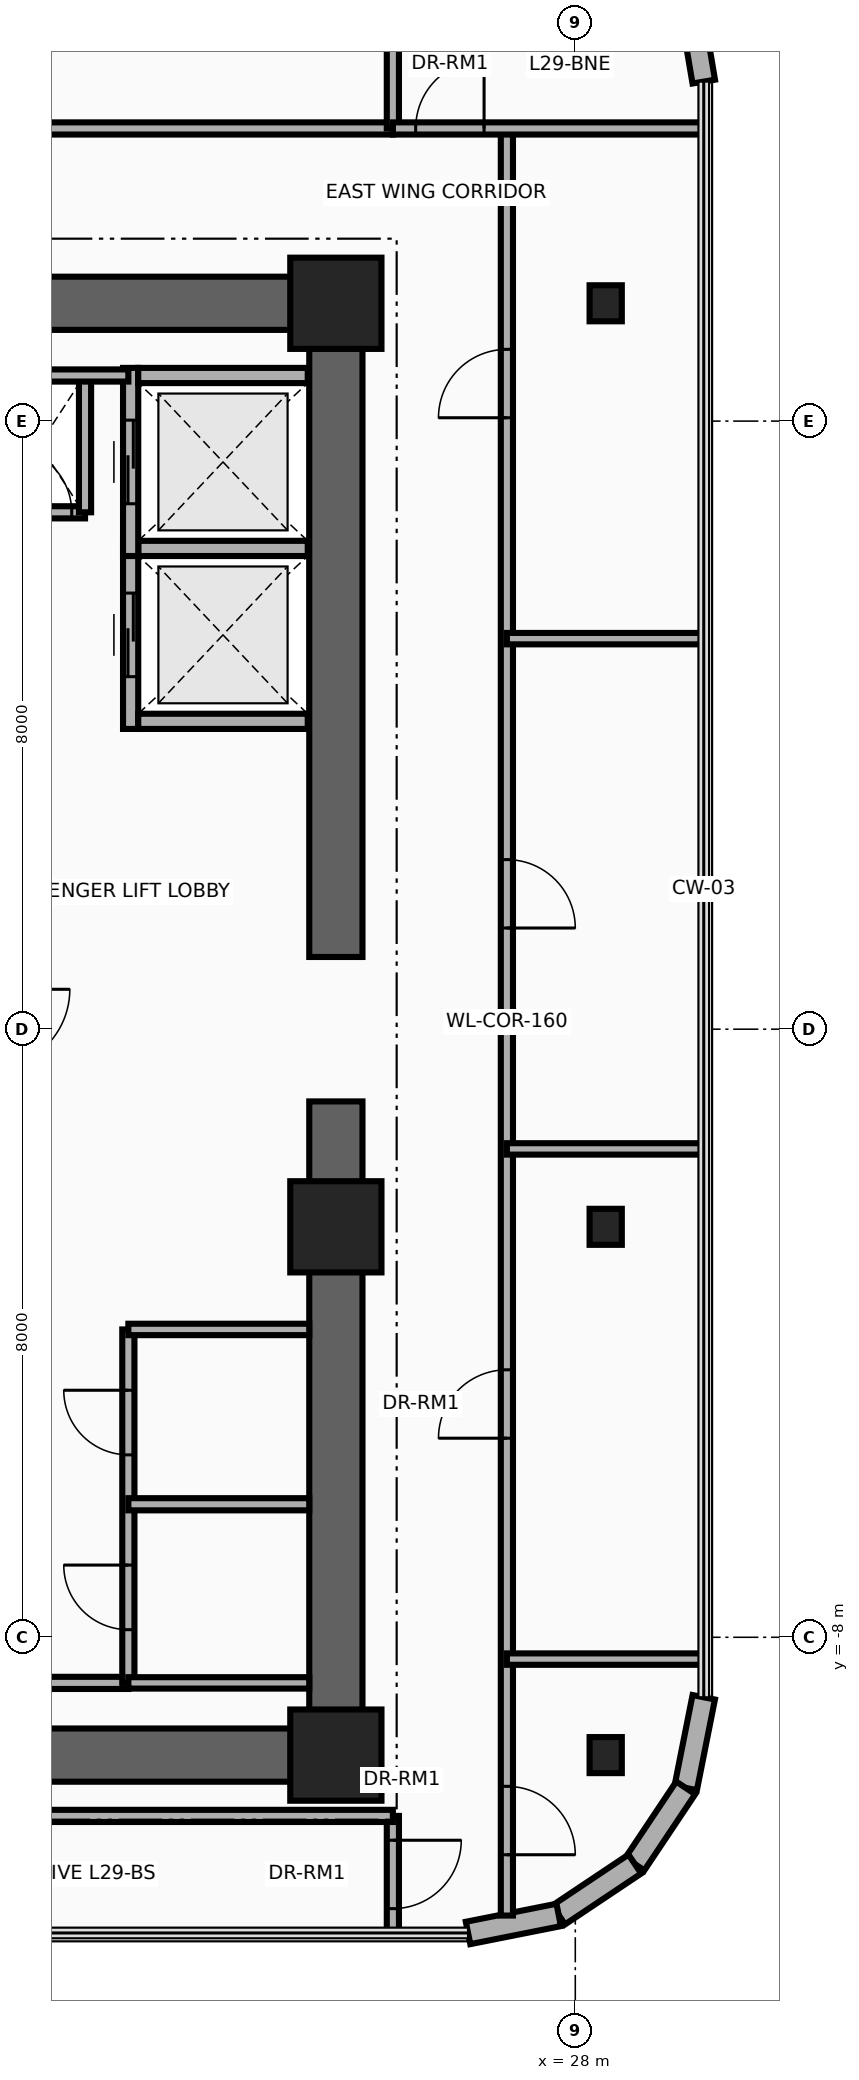
"""IFC4 building model, lengths in metres.
Left out: names, types, materials, properties, quantities, classifications, styles, units other than length and angle.
Written with IfcOpenShell. Run it as: python <this file> out.ifc"""

import sys

from ifc_helpers import new_model, si_unit, direction, frame, frame_2d, origin, origin_2d, place, context, subcontext, project, spatial, rectangle, i_section, extrude, source, transform, mapped, element, fill, save


model = new_model("IFC4")
c1 = context("Model", 3, precision=1e-05, world=origin(), true_north=direction((0.0, 1.0)))
c2 = subcontext(c1, "Body", "Model", "MODEL_VIEW")
j1 = project(units=[si_unit("LENGTHUNIT", "METRE"), si_unit("PLANEANGLEUNIT", "RADIAN")], contexts=[c1])
p1 = place(None, origin())
s1 = spatial("IfcSite", under=j1, at=p1, CompositionType="ELEMENT")
p2 = place(p1, origin())
s2 = spatial("IfcBuilding", under=s1, at=p2, CompositionType="ELEMENT")
p3 = place(p2, frame((0.0, 0.0, 116.8)))
s3 = spatial("IfcBuildingStorey", under=s2, at=p3, CompositionType="ELEMENT", Elevation=116.8)
for number, where, z_axis, x_axis in (
    (1, (24.85, -9.9, 0.0), (0.0, 0.0, 1.0), (0.0, 1.0, 0.0)),
    (2, (24.85, 0.95, 0.0), (0.0, 0.0, 1.0), (0.0, 1.0, 0.0)),
):
    element("IfcWall", number, at=place(p3, frame(where, z_axis=z_axis, x_axis=x_axis)), inside=s3, PredefinedType="SHEAR", context=c2, shape_type="SweptSolid", body=[
        extrude(rectangle(XDim=8.95, YDim=0.7, at=frame_2d((4.475, 0.0))), origin(), (0.0, 0.0, 1.0), 3.46),
    ])
for number, where, z_axis, x_axis in (
    (3, (15.85, 9.55, 0.0), (0.0, 0.0, 1.0), (1.0, 0.0, 0.0)),
    (4, (15.85, -9.55, 0.0), (0.0, 0.0, 1.0), (1.0, 0.0, 0.0)),
):
    element("IfcWall", number, at=place(p3, frame(where, z_axis=z_axis, x_axis=x_axis)), inside=s3, PredefinedType="SHEAR", context=c2, shape_type="SweptSolid", body=[
        extrude(rectangle(XDim=9.0, YDim=0.7, at=frame_2d((4.5, 0.0))), origin(), (0.0, 0.0, 1.0), 3.46),
    ])
m1 = source(origin(), c2, "Body", "SweptSolid", [
    extrude(rectangle(XDim=1.2, YDim=1.2, at=origin_2d()), origin(), (0.0, 0.0, 1.0), 3.7),
])
p4 = place(p3, frame((24.85, -9.55, 0.0), z_axis=(0.0, 0.0, 1.0), x_axis=(1.0, 0.0, 0.0)))
e5 = element("IfcColumn", 5, at=p4, inside=s3, PredefinedType="COLUMN", context=c2, shape_type="MappedRepresentation", body=[
    mapped(m1, transform((0.0, 0.0, 0.0), x_axis=(1.0, 0.0, 0.0), y_axis=(0.0, 1.0, 0.0), z_axis=(0.0, 0.0, 1.0), scale=1.0)),
])
m2 = source(origin(), c2, "Body", "SweptSolid", [
    extrude(i_section(OverallWidth=0.424, OverallDepth=0.474, WebThickness=0.048, FlangeThickness=0.077, at=origin_2d()), origin(), (0.0, 0.0, 1.0), 3.7),
])
p5 = place(p3, frame((28.4, -9.55, 0.0), z_axis=(0.0, 0.0, 1.0), x_axis=(1.0, 0.0, 0.0)))
e6 = element("IfcColumn", 6, at=p5, inside=s3, PredefinedType="COLUMN", context=c2, shape_type="MappedRepresentation", body=[
    mapped(m2, transform((0.0, 0.0, 0.0), x_axis=(1.0, 0.0, 0.0), y_axis=(0.0, 1.0, 0.0), z_axis=(0.0, 0.0, 1.0), scale=1.0)),
])
p6 = place(p3, frame((24.85, -2.6, 0.0), z_axis=(0.0, 0.0, 1.0), x_axis=(1.0, 0.0, 0.0)))
e7 = element("IfcColumn", 7, at=p6, inside=s3, PredefinedType="COLUMN", context=c2, shape_type="MappedRepresentation", body=[
    mapped(m1, transform((0.0, 0.0, 0.0), x_axis=(1.0, 0.0, 0.0), y_axis=(0.0, 1.0, 0.0), z_axis=(0.0, 0.0, 1.0), scale=1.0)),
])
p7 = place(p3, frame((28.4, -2.6, 0.0), z_axis=(0.0, 0.0, 1.0), x_axis=(1.0, 0.0, 0.0)))
e8 = element("IfcColumn", 8, at=p7, inside=s3, PredefinedType="COLUMN", context=c2, shape_type="MappedRepresentation", body=[
    mapped(m2, transform((0.0, 0.0, 0.0), x_axis=(1.0, 0.0, 0.0), y_axis=(0.0, 1.0, 0.0), z_axis=(0.0, 0.0, 1.0), scale=1.0)),
])
p8 = place(p3, frame((24.85, 9.55, 0.0), z_axis=(0.0, 0.0, 1.0), x_axis=(1.0, 0.0, 0.0)))
e9 = element("IfcColumn", 9, at=p8, inside=s3, PredefinedType="COLUMN", context=c2, shape_type="MappedRepresentation", body=[
    mapped(m1, transform((0.0, 0.0, 0.0), x_axis=(1.0, 0.0, 0.0), y_axis=(0.0, 1.0, 0.0), z_axis=(0.0, 0.0, 1.0), scale=1.0)),
])
p9 = place(p3, frame((28.4, 9.55, 0.0), z_axis=(0.0, 0.0, 1.0), x_axis=(1.0, 0.0, 0.0)))
e10 = element("IfcColumn", 10, at=p9, inside=s3, PredefinedType="COLUMN", context=c2, shape_type="MappedRepresentation", body=[
    mapped(m2, transform((0.0, 0.0, 0.0), x_axis=(1.0, 0.0, 0.0), y_axis=(0.0, 1.0, 0.0), z_axis=(0.0, 0.0, 1.0), scale=1.0)),
])
p10 = place(p3, frame((29.518, 13.488, 0.0), z_axis=(0.0, 0.0, 1.0), x_axis=(0.166156796952, -0.986099345313, 0.0)))
e11 = element("IfcWall", 11, at=p10, inside=s3, PredefinedType="SOLIDWALL", context=c2, shape_type="SweptSolid", body=[
    extrude(rectangle(XDim=1.036, YDim=0.3, at=frame_2d((0.518, 0.0))), origin(), (0.0, 0.0, 1.0), 3.46),
])
p11 = place(p3, frame((29.69, -8.789, 0.0), z_axis=(0.0, 0.0, 1.0), x_axis=(-0.194996050505, -0.980804027463, 0.0)))
e12 = element("IfcWall", 12, at=p11, inside=s3, PredefinedType="SOLIDWALL", context=c2, shape_type="SweptSolid", body=[
    extrude(rectangle(XDim=1.216, YDim=0.3, at=frame_2d((0.608, 0.0))), origin(), (0.0, 0.0, 1.0), 3.46),
])
for number, where, z_axis, x_axis in (
    (13, (29.453, -9.982, 0.0), (0.0, 0.0, 1.0), (-0.556, -0.831, 0.0)),
    (14, (28.783, -10.983, 0.0), (0.0, 0.0, 1.0), (-0.831, -0.556, 0.0)),
):
    element("IfcWall", number, at=place(p3, frame(where, z_axis=z_axis, x_axis=x_axis)), inside=s3, PredefinedType="SOLIDWALL", context=c2, shape_type="SweptSolid", body=[
        extrude(rectangle(XDim=1.205, YDim=0.3, at=frame_2d((0.603, 0.0))), origin(), (0.0, 0.0, 1.0), 3.46),
    ])
p12 = place(p3, frame((27.782, -11.653, 0.0), z_axis=(0.0, 0.0, 1.0), x_axis=(-0.980811661072, -0.194957650543, 0.0)))
e15 = element("IfcWall", 15, at=p12, inside=s3, PredefinedType="SOLIDWALL", context=c2, shape_type="SweptSolid", body=[
    extrude(rectangle(XDim=1.216, YDim=0.3, at=frame_2d((0.608, 0.0))), origin(), (0.0, 0.0, 1.0), 3.46),
])
p13 = place(p3, frame((22.15, 3.95, 0.0), z_axis=(0.0, 0.0, 1.0), x_axis=(0.0, 1.0, 0.0)))
e16 = element("IfcWall", 16, at=p13, inside=s3, PredefinedType="MOVABLE", context=c2, shape_type="SweptSolid", body=[
    extrude(rectangle(XDim=2.475, YDim=0.2, at=frame_2d((1.238, 0.0))), origin(), (0.0, 0.0, 1.0), 3.46),
])
p14 = place(p13, frame((0.688, 0.0, 0.0)))
e17 = element("IfcOpeningElement", 17, at=p14, cuts=e16, PredefinedType="OPENING", context=c2, shape_type="SweptSolid", body=[
    extrude(rectangle(XDim=1.1, YDim=2.1, at=frame_2d((0.55, 1.05))), frame((0.0, 0.115, 0.0), z_axis=(0.0, -1.0, 0.0), x_axis=(1.0, 0.0, 0.0)), (0.0, 0.0, 1.0), 0.23),
])
for number, where, z_axis, x_axis in (
    (18, (22.25, 4.05, 0.0), (0.0, 0.0, 1.0), (1.0, 0.0, 0.0)),
    (19, (22.25, 6.325, 0.0), (0.0, 0.0, 1.0), (1.0, 0.0, 0.0)),
):
    element("IfcWall", number, at=place(p3, frame(where, z_axis=z_axis, x_axis=x_axis)), inside=s3, PredefinedType="MOVABLE", context=c2, shape_type="SweptSolid", body=[
        extrude(rectangle(XDim=2.23, YDim=0.2, at=frame_2d((1.115, 0.0))), origin(), (0.0, 0.0, 1.0), 2.245),
    ])
p15 = place(p3, frame((22.15, 6.225, 0.0), z_axis=(0.0, 0.0, 1.0), x_axis=(0.0, 1.0, 0.0)))
e20 = element("IfcWall", 20, at=p15, inside=s3, PredefinedType="MOVABLE", context=c2, shape_type="SweptSolid", body=[
    extrude(rectangle(XDim=2.475, YDim=0.2, at=frame_2d((1.237, 0.0))), origin(), (0.0, 0.0, 1.0), 3.46),
])
p16 = place(p15, frame((0.688, 0.0, 0.0)))
e21 = element("IfcOpeningElement", 21, at=p16, cuts=e20, PredefinedType="OPENING", context=c2, shape_type="SweptSolid", body=[
    extrude(rectangle(XDim=1.1, YDim=2.1, at=frame_2d((0.55, 1.05))), frame((0.0, 0.115, 0.0), z_axis=(0.0, -1.0, 0.0), x_axis=(1.0, 0.0, 0.0)), (0.0, 0.0, 1.0), 0.23),
])
p17 = place(p3, frame((22.25, 8.6, 0.0), z_axis=(0.0, 0.0, 1.0), x_axis=(1.0, 0.0, 0.0)))
e22 = element("IfcWall", 22, at=p17, inside=s3, PredefinedType="MOVABLE", context=c2, shape_type="SweptSolid", body=[
    extrude(rectangle(XDim=2.23, YDim=0.2, at=frame_2d((1.115, 0.0))), origin(), (0.0, 0.0, 1.0), 2.245),
])
p18 = place(p3, frame((20.35, 6.8, 0.0), z_axis=(0.0, 0.0, 1.0), x_axis=(1.0, 0.0, 0.0)))
e23 = element("IfcWall", 23, at=p18, inside=s3, PredefinedType="PARTITIONING", context=c2, shape_type="SweptSolid", body=[
    extrude(rectangle(XDim=1.2, YDim=0.16, at=frame_2d((0.6, 0.0))), origin(), (0.0, 0.0, 1.0), 3.46),
])
p19 = place(p18, frame((0.175, 0.0, 0.0)))
e24 = element("IfcOpeningElement", 24, at=p19, cuts=e23, PredefinedType="OPENING", context=c2, shape_type="SweptSolid", body=[
    extrude(rectangle(XDim=0.85, YDim=2.05, at=frame_2d((0.425, 1.025))), frame((0.0, 0.095, 0.0), z_axis=(0.0, -1.0, 0.0), x_axis=(1.0, 0.0, 0.0)), (0.0, 0.0, 1.0), 0.19),
])
p20 = place(p3, frame((21.55, 6.8, 0.0), z_axis=(0.0, 0.0, 1.0), x_axis=(0.0, 1.0, 0.0)))
e25 = element("IfcWall", 25, at=p20, inside=s3, PredefinedType="PARTITIONING", context=c2, shape_type="SweptSolid", body=[
    extrude(rectangle(XDim=1.8, YDim=0.16, at=frame_2d((0.9, 0.0))), origin(), (0.0, 0.0, 1.0), 3.46),
])
for number, where, z_axis, x_axis in (
    (26, (20.3, -8.6, 0.0), (0.0, 0.0, 1.0), (1.0, 0.0, 0.0)),
    (27, (20.3, 8.6, 0.0), (0.0, 0.0, 1.0), (1.0, 0.0, 0.0)),
):
    element("IfcWall", number, at=place(p3, frame(where, z_axis=z_axis, x_axis=x_axis)), inside=s3, PredefinedType="PARTITIONING", context=c2, shape_type="SweptSolid", body=[
        extrude(rectangle(XDim=1.82, YDim=0.16, at=frame_2d((0.91, 0.0))), origin(), (0.0, 0.0, 1.0), 3.46),
    ])
p21 = place(p3, frame((22.12, -8.6, 0.0), z_axis=(0.0, 0.0, 1.0), x_axis=(0.0, 1.0, 0.0)))
e28 = element("IfcWall", 28, at=p21, inside=s3, PredefinedType="PARTITIONING", context=c2, shape_type="SweptSolid", body=[
    extrude(rectangle(XDim=4.65, YDim=0.16, at=frame_2d((2.325, 0.0))), origin(), (0.0, 0.0, 1.0), 3.46),
])
p22 = place(p21, frame((0.7, 0.0, 0.0)))
e29 = element("IfcOpeningElement", 29, at=p22, cuts=e28, PredefinedType="OPENING", context=c2, shape_type="SweptSolid", body=[
    extrude(rectangle(XDim=0.85, YDim=2.05, at=frame_2d((0.425, 1.025))), frame((0.0, 0.095, 0.0), z_axis=(0.0, -1.0, 0.0), x_axis=(1.0, 0.0, 0.0)), (0.0, 0.0, 1.0), 0.19),
])
p23 = place(p21, frame((3.0, 0.0, 0.0)))
e30 = element("IfcOpeningElement", 30, at=p23, cuts=e28, PredefinedType="OPENING", context=c2, shape_type="SweptSolid", body=[
    extrude(rectangle(XDim=0.85, YDim=2.05, at=frame_2d((0.425, 1.025))), frame((0.0, 0.095, 0.0), z_axis=(0.0, -1.0, 0.0), x_axis=(1.0, 0.0, 0.0)), (0.0, 0.0, 1.0), 0.19),
])
for number, where, z_axis, x_axis in (
    (31, (22.12, -3.95, 0.0), (0.0, 0.0, 1.0), (1.0, 0.0, 0.0)),
    (32, (22.12, -8.6, 0.0), (0.0, 0.0, 1.0), (1.0, 0.0, 0.0)),
):
    element("IfcWall", number, at=place(p3, frame(where, z_axis=z_axis, x_axis=x_axis)), inside=s3, PredefinedType="PARTITIONING", context=c2, shape_type="SweptSolid", body=[
        extrude(rectangle(XDim=2.38, YDim=0.15, at=frame_2d((1.19, 0.0))), origin(), (0.0, 0.0, 1.0), 3.46),
    ])
p24 = place(p3, frame((22.12, -6.25, 0.0), z_axis=(0.0, 0.0, 1.0), x_axis=(1.0, 0.0, 0.0)))
e33 = element("IfcWall", 33, at=p24, inside=s3, PredefinedType="PARTITIONING", context=c2, shape_type="SweptSolid", body=[
    extrude(rectangle(XDim=2.38, YDim=0.16, at=frame_2d((1.19, 0.0))), origin(), (0.0, 0.0, 1.0), 3.46),
])
p25 = place(p3, frame((15.4, 11.85, 0.0), z_axis=(0.0, 0.0, 1.0), x_axis=(1.0, 0.0, 0.0)))
e34 = element("IfcWall", 34, at=p25, inside=s3, PredefinedType="PARTITIONING", context=c2, shape_type="SweptSolid", body=[
    extrude(rectangle(XDim=10.2, YDim=0.16, at=frame_2d((5.1, 0.0))), origin(), (0.0, 0.0, 1.0), 2.834),
])
p26 = place(p25, frame((4.625, 0.0, 0.0)))
e35 = element("IfcOpeningElement", 35, at=p26, cuts=e34, PredefinedType="OPENING", context=c2, shape_type="SweptSolid", body=[
    extrude(rectangle(XDim=0.95, YDim=2.15, at=frame_2d((0.475, 1.075))), frame((0.0, 0.095, 0.0), z_axis=(0.0, -1.0, 0.0), x_axis=(1.0, 0.0, 0.0)), (0.0, 0.0, 1.0), 0.19),
])
p27 = place(p3, frame((25.6, 11.85, 0.0), z_axis=(0.0, 0.0, 1.0), x_axis=(0.0, 1.0, 0.0)))
e36 = element("IfcWall", 36, at=p27, inside=s3, PredefinedType="PARTITIONING", context=c2, shape_type="SweptSolid", body=[
    extrude(rectangle(XDim=4.042, YDim=0.16, at=frame_2d((2.021, 0.0))), origin(), (0.0, 0.0, 1.0), 2.666),
])
p28 = place(p3, frame((25.6, -11.89, 0.0), z_axis=(0.0, 0.0, 1.0), x_axis=(0.0, 1.0, 0.0)))
e37 = element("IfcWall", 37, at=p28, inside=s3, PredefinedType="PARTITIONING", context=c2, shape_type="SweptSolid", body=[
    extrude(rectangle(XDim=1.54, YDim=0.16, at=frame_2d((0.77, 0.0))), origin(), (0.0, 0.0, 1.0), 3.46),
])
p29 = place(p28, frame((0.32, 0.0, 0.0)))
e38 = element("IfcOpeningElement", 38, at=p29, cuts=e37, PredefinedType="OPENING", context=c2, shape_type="SweptSolid", body=[
    extrude(rectangle(XDim=0.9, YDim=2.1, at=frame_2d((0.45, 1.05))), frame((0.0, 0.095, 0.0), z_axis=(0.0, -1.0, 0.0), x_axis=(1.0, 0.0, 0.0)), (0.0, 0.0, 1.0), 0.19),
])
p30 = place(p3, frame((14.044, -10.35, 0.0), z_axis=(0.0, 0.0, 1.0), x_axis=(1.0, 0.0, 0.0)))
e39 = element("IfcWall", 39, at=p30, inside=s3, PredefinedType="PARTITIONING", context=c2, shape_type="SweptSolid", body=[
    extrude(rectangle(XDim=11.556, YDim=0.16, at=frame_2d((5.778, 0.0))), origin(), (0.0, 0.0, 1.0), 3.46),
])
p31 = place(p3, frame((27.1, -11.661, 0.0), z_axis=(0.0, 0.0, 1.0), x_axis=(0.0, 1.0, 0.0)))
e40 = element("IfcWall", 40, at=p31, inside=s3, PredefinedType="PARTITIONING", context=c2, shape_type="SweptSolid", body=[
    extrude(rectangle(XDim=23.511, YDim=0.16, at=frame_2d((11.755, 0.0))), origin(), (0.0, 0.0, 1.0), 2.666),
])
p32 = place(p31, frame((0.8, 0.0, 0.0)))
e41 = element("IfcOpeningElement", 41, at=p32, cuts=e40, PredefinedType="OPENING", context=c2, shape_type="SweptSolid", body=[
    extrude(rectangle(XDim=0.9, YDim=2.1, at=frame_2d((0.45, 1.05))), frame((0.0, 0.095, 0.0), z_axis=(0.0, -1.0, 0.0), x_axis=(1.0, 0.0, 0.0)), (0.0, 0.0, 1.0), 0.19),
])
p33 = place(p31, frame((6.28, 0.0, 0.0)))
e42 = element("IfcOpeningElement", 42, at=p33, cuts=e40, PredefinedType="OPENING", context=c2, shape_type="SweptSolid", body=[
    extrude(rectangle(XDim=0.9, YDim=2.1, at=frame_2d((0.45, 1.05))), frame((0.0, 0.095, 0.0), z_axis=(0.0, -1.0, 0.0), x_axis=(1.0, 0.0, 0.0)), (0.0, 0.0, 1.0), 0.19),
])
p34 = place(p31, frame((12.992, 0.0, 0.0)))
e43 = element("IfcOpeningElement", 43, at=p34, cuts=e40, PredefinedType="OPENING", context=c2, shape_type="SweptSolid", body=[
    extrude(rectangle(XDim=0.9, YDim=2.1, at=frame_2d((0.45, 1.05))), frame((0.0, 0.095, 0.0), z_axis=(0.0, -1.0, 0.0), x_axis=(1.0, 0.0, 0.0)), (0.0, 0.0, 1.0), 0.19),
])
p35 = place(p31, frame((19.705, 0.0, 0.0)))
e44 = element("IfcOpeningElement", 44, at=p35, cuts=e40, PredefinedType="OPENING", context=c2, shape_type="SweptSolid", body=[
    extrude(rectangle(XDim=0.9, YDim=2.1, at=frame_2d((0.45, 1.05))), frame((0.0, 0.095, 0.0), z_axis=(0.0, -1.0, 0.0), x_axis=(1.0, 0.0, 0.0)), (0.0, 0.0, 1.0), 0.19),
])
p36 = place(p3, frame((25.6, 11.85, 0.0), z_axis=(0.0, 0.0, 1.0), x_axis=(1.0, 0.0, 0.0)))
e45 = element("IfcWall", 45, at=p36, inside=s3, PredefinedType="PARTITIONING", context=c2, shape_type="SweptSolid", body=[
    extrude(rectangle(XDim=4.09, YDim=0.16, at=frame_2d((2.045, 0.0))), origin(), (0.0, 0.0, 1.0), 2.896),
])
p37 = place(p36, frame((0.3, 0.0, 0.0)))
e46 = element("IfcOpeningElement", 46, at=p37, cuts=e45, PredefinedType="OPENING", context=c2, shape_type="SweptSolid", body=[
    extrude(rectangle(XDim=0.9, YDim=2.1, at=frame_2d((0.45, 1.05))), frame((0.0, 0.095, 0.0), z_axis=(0.0, -1.0, 0.0), x_axis=(1.0, 0.0, 0.0)), (0.0, 0.0, 1.0), 0.19),
])
for number, where, z_axis, x_axis in (
    (47, (27.1, -8.287, 0.0), (0.0, 0.0, 1.0), (1.0, 0.0, 0.0)),
    (48, (27.1, -1.575, 0.0), (0.0, 0.0, 1.0), (1.0, 0.0, 0.0)),
    (49, (27.1, 5.138, 0.0), (0.0, 0.0, 1.0), (1.0, 0.0, 0.0)),
):
    element("IfcWall", number, at=place(p3, frame(where, z_axis=z_axis, x_axis=x_axis)), inside=s3, PredefinedType="PARTITIONING", context=c2, shape_type="SweptSolid", body=[
        extrude(rectangle(XDim=2.59, YDim=0.15, at=frame_2d((1.295, 0.0))), origin(), (0.0, 0.0, 1.0), 2.896),
    ])
p38 = place(p14, origin())
e50 = element("IfcDoor", 50, at=p38, inside=s3, OperationType="DOUBLE_DOOR_SLIDING", PredefinedType="DOOR", context=c2, shape_type="SweptSolid", body=[
    extrude(rectangle(XDim=1.1, YDim=2.1, at=frame_2d((0.55, 1.05))), frame((0.0, 0.025, 0.0), z_axis=(0.0, -1.0, 0.0), x_axis=(1.0, 0.0, 0.0)), (0.0, 0.0, 1.0), 0.05),
])
fill(e17, e50)
p39 = place(p16, origin())
e51 = element("IfcDoor", 51, at=p39, inside=s3, OperationType="DOUBLE_DOOR_SLIDING", PredefinedType="DOOR", context=c2, shape_type="SweptSolid", body=[
    extrude(rectangle(XDim=1.1, YDim=2.1, at=frame_2d((0.55, 1.05))), frame((0.0, 0.025, 0.0), z_axis=(0.0, -1.0, 0.0), x_axis=(1.0, 0.0, 0.0)), (0.0, 0.0, 1.0), 0.05),
])
fill(e21, e51)
p40 = place(p19, origin())
e52 = element("IfcDoor", 52, at=p40, inside=s3, OperationType="SINGLE_SWING_RIGHT", PredefinedType="DOOR", context=c2, shape_type="SweptSolid", body=[
    extrude(rectangle(XDim=0.85, YDim=2.05, at=frame_2d((0.425, 1.025))), frame((0.0, 0.025, 0.0), z_axis=(0.0, -1.0, 0.0), x_axis=(1.0, 0.0, 0.0)), (0.0, 0.0, 1.0), 0.05),
])
fill(e24, e52)
p41 = place(p22, origin())
e53 = element("IfcDoor", 53, at=p41, inside=s3, OperationType="SINGLE_SWING_LEFT", PredefinedType="DOOR", context=c2, shape_type="SweptSolid", body=[
    extrude(rectangle(XDim=0.85, YDim=2.05, at=frame_2d((0.425, 1.025))), frame((0.0, 0.025, 0.0), z_axis=(0.0, -1.0, 0.0), x_axis=(1.0, 0.0, 0.0)), (0.0, 0.0, 1.0), 0.05),
])
fill(e29, e53)
p42 = place(p23, origin())
e54 = element("IfcDoor", 54, at=p42, inside=s3, OperationType="SINGLE_SWING_RIGHT", PredefinedType="DOOR", context=c2, shape_type="SweptSolid", body=[
    extrude(rectangle(XDim=0.85, YDim=2.05, at=frame_2d((0.425, 1.025))), frame((0.0, 0.025, 0.0), z_axis=(0.0, -1.0, 0.0), x_axis=(1.0, 0.0, 0.0)), (0.0, 0.0, 1.0), 0.05),
])
fill(e30, e54)
p43 = place(p29, frame((0.9, 0.0, 0.0), z_axis=(0.0, 0.0, 1.0), x_axis=(-1.0, 0.0, 0.0)))
e55 = element("IfcDoor", 55, at=p43, inside=s3, OperationType="SINGLE_SWING_LEFT", PredefinedType="DOOR", context=c2, shape_type="SweptSolid", body=[
    extrude(rectangle(XDim=0.9, YDim=2.1, at=frame_2d((0.45, 1.05))), frame((0.0, 0.025, 0.0), z_axis=(0.0, -1.0, 0.0), x_axis=(1.0, 0.0, 0.0)), (0.0, 0.0, 1.0), 0.05),
])
fill(e38, e55)
p44 = place(p37, origin())
e56 = element("IfcDoor", 56, at=p44, inside=s3, OperationType="SINGLE_SWING_RIGHT", PredefinedType="DOOR", context=c2, shape_type="SweptSolid", body=[
    extrude(rectangle(XDim=0.9, YDim=2.1, at=frame_2d((0.45, 1.05))), frame((0.0, 0.025, 0.0), z_axis=(0.0, -1.0, 0.0), x_axis=(1.0, 0.0, 0.0)), (0.0, 0.0, 1.0), 0.05),
])
fill(e46, e56)
p45 = place(p32, frame((0.9, 0.0, 0.0), z_axis=(0.0, 0.0, 1.0), x_axis=(-1.0, 0.0, 0.0)))
e57 = element("IfcDoor", 57, at=p45, inside=s3, OperationType="SINGLE_SWING_LEFT", PredefinedType="DOOR", context=c2, shape_type="SweptSolid", body=[
    extrude(rectangle(XDim=0.9, YDim=2.1, at=frame_2d((0.45, 1.05))), frame((0.0, 0.025, 0.0), z_axis=(0.0, -1.0, 0.0), x_axis=(1.0, 0.0, 0.0)), (0.0, 0.0, 1.0), 0.05),
])
fill(e41, e57)
p46 = place(p33, origin())
e58 = element("IfcDoor", 58, at=p46, inside=s3, OperationType="SINGLE_SWING_RIGHT", PredefinedType="DOOR", context=c2, shape_type="SweptSolid", body=[
    extrude(rectangle(XDim=0.9, YDim=2.1, at=frame_2d((0.45, 1.05))), frame((0.0, 0.025, 0.0), z_axis=(0.0, -1.0, 0.0), x_axis=(1.0, 0.0, 0.0)), (0.0, 0.0, 1.0), 0.05),
])
fill(e42, e58)
p47 = place(p34, frame((0.9, 0.0, 0.0), z_axis=(0.0, 0.0, 1.0), x_axis=(-1.0, 0.0, 0.0)))
e59 = element("IfcDoor", 59, at=p47, inside=s3, OperationType="SINGLE_SWING_LEFT", PredefinedType="DOOR", context=c2, shape_type="SweptSolid", body=[
    extrude(rectangle(XDim=0.9, YDim=2.1, at=frame_2d((0.45, 1.05))), frame((0.0, 0.025, 0.0), z_axis=(0.0, -1.0, 0.0), x_axis=(1.0, 0.0, 0.0)), (0.0, 0.0, 1.0), 0.05),
])
fill(e43, e59)
p48 = place(p35, origin())
e60 = element("IfcDoor", 60, at=p48, inside=s3, OperationType="SINGLE_SWING_RIGHT", PredefinedType="DOOR", context=c2, shape_type="SweptSolid", body=[
    extrude(rectangle(XDim=0.9, YDim=2.1, at=frame_2d((0.45, 1.05))), frame((0.0, 0.025, 0.0), z_axis=(0.0, -1.0, 0.0), x_axis=(1.0, 0.0, 0.0)), (0.0, 0.0, 1.0), 0.05),
])
fill(e44, e60)
save(model, sys.argv[1])
